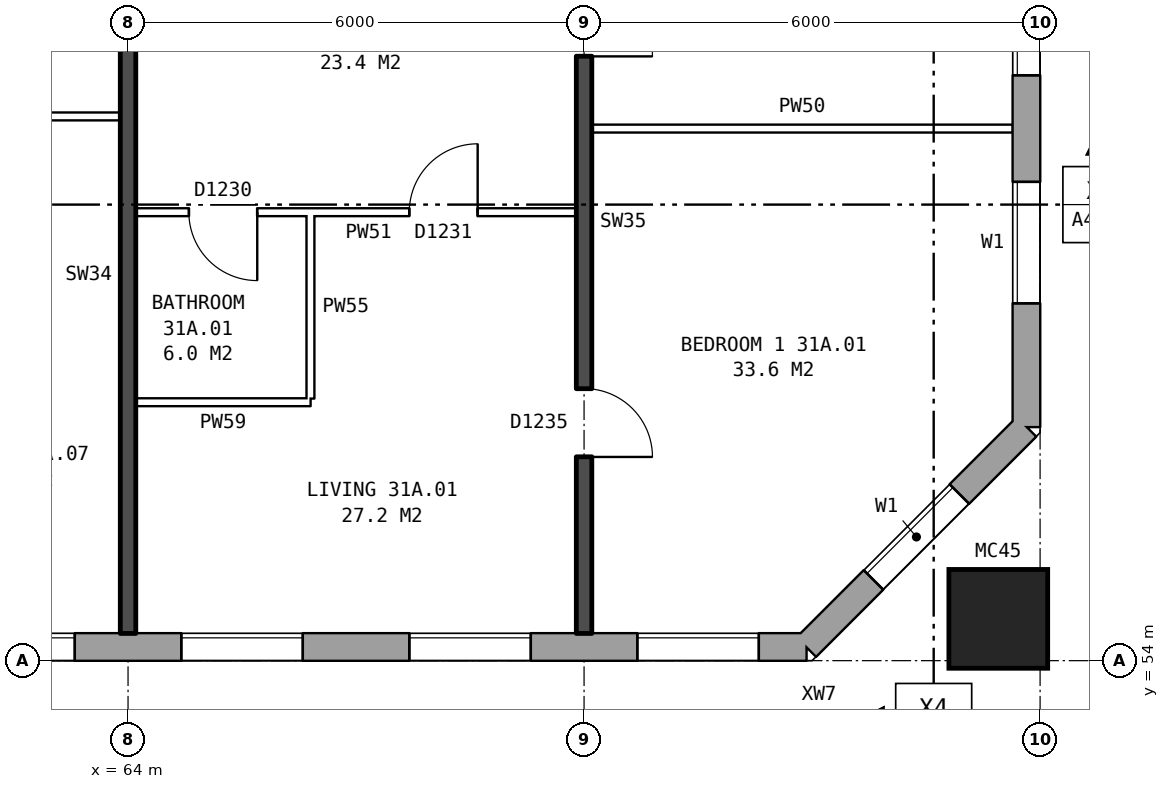
"""IFC4 building model, lengths in metres.
Left out: names, types, materials, properties, quantities, classifications, styles, units other than length and angle.
Written with IfcOpenShell. Run it as: python <this file> out.ifc"""

import sys

from ifc_helpers import new_model, si_unit, direction, frame, frame_2d, origin, origin_2d, place, context, subcontext, project, spatial, rectangle, hollow_rectangle, extrude, element, fill, save


model = new_model("IFC4")
c1 = context("Model", 3, precision=1e-05, world=origin(), true_north=direction((0.0, 1.0)))
c2 = subcontext(c1, "Body", "Model", "MODEL_VIEW")
j1 = project(units=[si_unit("LENGTHUNIT", "METRE"), si_unit("PLANEANGLEUNIT", "RADIAN")], contexts=[c1])
p1 = place(None, origin())
s1 = spatial("IfcSite", under=j1, at=p1, CompositionType="ELEMENT")
p2 = place(p1, origin())
s2 = spatial("IfcBuilding", under=s1, at=p2, CompositionType="ELEMENT")
p3 = place(p2, frame((0.0, 0.0, 111.9)))
s3 = spatial("IfcBuildingStorey", under=s2, at=p3, CompositionType="ELEMENT", Elevation=111.9)
p4 = place(p3, frame((75.45, 54.55, 0.0), z_axis=(0.0, 0.0, 1.0), x_axis=(1.0, 0.0, 0.0)))
e1 = element("IfcColumn", 1, at=p4, inside=s3, PredefinedType="COLUMN", context=c2, shape_type="SweptSolid", body=[
    extrude(hollow_rectangle(XDim=1.3, YDim=1.3, WallThickness=0.07, at=origin_2d()), origin(), (0.0, 0.0, 1.0), 3.1),
])
p5 = place(p3, frame((28.075, 54.18, 0.0), z_axis=(0.0, 0.0, 1.0), x_axis=(1.0, 0.0, 0.0)))
e2 = element("IfcWall", 2, at=p5, inside=s3, PredefinedType="STANDARD", context=c2, shape_type="SweptSolid", body=[
    extrude(rectangle(XDim=44.851, YDim=0.36, at=frame_2d((22.425, 0.0))), origin(), (0.0, 0.0, 1.0), 2.85),
])
p6 = place(p5, frame((0.625, 0.0, 0.8)))
e3 = element("IfcOpeningElement", 3, at=p6, cuts=e2, PredefinedType="OPENING", context=c2, shape_type="SweptSolid", body=[
    extrude(rectangle(XDim=1.6, YDim=1.8, at=frame_2d((0.8, 0.9))), frame((0.0, 0.19, 0.0), z_axis=(0.0, -1.0, 0.0), x_axis=(1.0, 0.0, 0.0)), (0.0, 0.0, 1.0), 0.38),
])
p7 = place(p5, frame((3.625, 0.0, 0.8)))
e4 = element("IfcOpeningElement", 4, at=p7, cuts=e2, PredefinedType="OPENING", context=c2, shape_type="SweptSolid", body=[
    extrude(rectangle(XDim=1.6, YDim=1.8, at=frame_2d((0.8, 0.9))), frame((0.0, 0.19, 0.0), z_axis=(0.0, -1.0, 0.0), x_axis=(1.0, 0.0, 0.0)), (0.0, 0.0, 1.0), 0.38),
])
p8 = place(p5, frame((6.625, 0.0, 0.8)))
e5 = element("IfcOpeningElement", 5, at=p8, cuts=e2, PredefinedType="OPENING", context=c2, shape_type="SweptSolid", body=[
    extrude(rectangle(XDim=1.6, YDim=1.8, at=frame_2d((0.8, 0.9))), frame((0.0, 0.19, 0.0), z_axis=(0.0, -1.0, 0.0), x_axis=(1.0, 0.0, 0.0)), (0.0, 0.0, 1.0), 0.38),
])
p9 = place(p5, frame((9.625, 0.0, 0.8)))
e6 = element("IfcOpeningElement", 6, at=p9, cuts=e2, PredefinedType="OPENING", context=c2, shape_type="SweptSolid", body=[
    extrude(rectangle(XDim=1.6, YDim=1.8, at=frame_2d((0.8, 0.9))), frame((0.0, 0.19, 0.0), z_axis=(0.0, -1.0, 0.0), x_axis=(1.0, 0.0, 0.0)), (0.0, 0.0, 1.0), 0.38),
])
p10 = place(p5, frame((12.625, 0.0, 0.8)))
e7 = element("IfcOpeningElement", 7, at=p10, cuts=e2, PredefinedType="OPENING", context=c2, shape_type="SweptSolid", body=[
    extrude(rectangle(XDim=1.6, YDim=1.8, at=frame_2d((0.8, 0.9))), frame((0.0, 0.19, 0.0), z_axis=(0.0, -1.0, 0.0), x_axis=(1.0, 0.0, 0.0)), (0.0, 0.0, 1.0), 0.38),
])
p11 = place(p5, frame((15.625, 0.0, 0.8)))
e8 = element("IfcOpeningElement", 8, at=p11, cuts=e2, PredefinedType="OPENING", context=c2, shape_type="SweptSolid", body=[
    extrude(rectangle(XDim=1.6, YDim=1.8, at=frame_2d((0.8, 0.9))), frame((0.0, 0.19, 0.0), z_axis=(0.0, -1.0, 0.0), x_axis=(1.0, 0.0, 0.0)), (0.0, 0.0, 1.0), 0.38),
])
p12 = place(p5, frame((18.125, 0.0, 0.8)))
e9 = element("IfcOpeningElement", 9, at=p12, cuts=e2, PredefinedType="OPENING", context=c2, shape_type="SweptSolid", body=[
    extrude(rectangle(XDim=1.0, YDim=1.8, at=frame_2d((0.5, 0.9))), frame((0.0, 0.19, 0.0), z_axis=(0.0, -1.0, 0.0), x_axis=(1.0, 0.0, 0.0)), (0.0, 0.0, 1.0), 0.38),
])
p13 = place(p5, frame((21.175, 0.0, 0.15)))
e10 = element("IfcOpeningElement", 10, at=p13, cuts=e2, PredefinedType="OPENING", context=c2, shape_type="SweptSolid", body=[
    extrude(rectangle(XDim=0.6, YDim=1.2, at=frame_2d((0.3, 0.6))), frame((0.0, 0.19, 0.0), z_axis=(0.0, -1.0, 0.0), x_axis=(1.0, 0.0, 0.0)), (0.0, 0.0, 1.0), 0.38),
])
p14 = place(p5, frame((24.425, 0.0, 1.7)))
e11 = element("IfcOpeningElement", 11, at=p14, cuts=e2, PredefinedType="OPENING", context=c2, shape_type="SweptSolid", body=[
    extrude(rectangle(XDim=1.0, YDim=0.9, at=frame_2d((0.5, 0.45))), frame((0.0, 0.19, 0.0), z_axis=(0.0, -1.0, 0.0), x_axis=(1.0, 0.0, 0.0)), (0.0, 0.0, 1.0), 0.38),
])
p15 = place(p5, frame((27.625, 0.0, 0.8)))
e12 = element("IfcOpeningElement", 12, at=p15, cuts=e2, PredefinedType="OPENING", context=c2, shape_type="SweptSolid", body=[
    extrude(rectangle(XDim=1.6, YDim=1.8, at=frame_2d((0.8, 0.9))), frame((0.0, 0.19, 0.0), z_axis=(0.0, -1.0, 0.0), x_axis=(1.0, 0.0, 0.0)), (0.0, 0.0, 1.0), 0.38),
])
p16 = place(p5, frame((30.625, 0.0, 0.8)))
e13 = element("IfcOpeningElement", 13, at=p16, cuts=e2, PredefinedType="OPENING", context=c2, shape_type="SweptSolid", body=[
    extrude(rectangle(XDim=1.6, YDim=1.8, at=frame_2d((0.8, 0.9))), frame((0.0, 0.19, 0.0), z_axis=(0.0, -1.0, 0.0), x_axis=(1.0, 0.0, 0.0)), (0.0, 0.0, 1.0), 0.38),
])
p17 = place(p5, frame((33.625, 0.0, 0.8)))
e14 = element("IfcOpeningElement", 14, at=p17, cuts=e2, PredefinedType="OPENING", context=c2, shape_type="SweptSolid", body=[
    extrude(rectangle(XDim=1.6, YDim=1.8, at=frame_2d((0.8, 0.9))), frame((0.0, 0.19, 0.0), z_axis=(0.0, -1.0, 0.0), x_axis=(1.0, 0.0, 0.0)), (0.0, 0.0, 1.0), 0.38),
])
p18 = place(p5, frame((36.625, 0.0, 0.8)))
e15 = element("IfcOpeningElement", 15, at=p18, cuts=e2, PredefinedType="OPENING", context=c2, shape_type="SweptSolid", body=[
    extrude(rectangle(XDim=1.6, YDim=1.8, at=frame_2d((0.8, 0.9))), frame((0.0, 0.19, 0.0), z_axis=(0.0, -1.0, 0.0), x_axis=(1.0, 0.0, 0.0)), (0.0, 0.0, 1.0), 0.38),
])
p19 = place(p5, frame((39.625, 0.0, 0.8)))
e16 = element("IfcOpeningElement", 16, at=p19, cuts=e2, PredefinedType="OPENING", context=c2, shape_type="SweptSolid", body=[
    extrude(rectangle(XDim=1.6, YDim=1.8, at=frame_2d((0.8, 0.9))), frame((0.0, 0.19, 0.0), z_axis=(0.0, -1.0, 0.0), x_axis=(1.0, 0.0, 0.0)), (0.0, 0.0, 1.0), 0.38),
])
p20 = place(p5, frame((42.625, 0.0, 0.8)))
e17 = element("IfcOpeningElement", 17, at=p20, cuts=e2, PredefinedType="OPENING", context=c2, shape_type="SweptSolid", body=[
    extrude(rectangle(XDim=1.6, YDim=1.8, at=frame_2d((0.8, 0.9))), frame((0.0, 0.19, 0.0), z_axis=(0.0, -1.0, 0.0), x_axis=(1.0, 0.0, 0.0)), (0.0, 0.0, 1.0), 0.38),
])
p21 = place(p5, frame((19.425, 0.0, 1.7)))
e18 = element("IfcOpeningElement", 18, at=p21, cuts=e2, PredefinedType="OPENING", context=c2, shape_type="SweptSolid", body=[
    extrude(rectangle(XDim=1.0, YDim=0.9, at=frame_2d((0.5, 0.45))), frame((0.0, 0.19, 0.0), z_axis=(0.0, -1.0, 0.0), x_axis=(1.0, 0.0, 0.0)), (0.0, 0.0, 1.0), 0.38),
])
p22 = place(p5, frame((22.075, 0.0, 0.15)))
e19 = element("IfcOpeningElement", 19, at=p22, cuts=e2, PredefinedType="OPENING", context=c2, shape_type="SweptSolid", body=[
    extrude(rectangle(XDim=1.6, YDim=1.2, at=frame_2d((0.8, 0.6))), frame((0.0, 0.19, 0.0), z_axis=(0.0, -1.0, 0.0), x_axis=(1.0, 0.0, 0.0)), (0.0, 0.0, 1.0), 0.38),
])
p23 = place(p5, frame((25.725, 0.0, 0.8)))
e20 = element("IfcOpeningElement", 20, at=p23, cuts=e2, PredefinedType="OPENING", context=c2, shape_type="SweptSolid", body=[
    extrude(rectangle(XDim=1.0, YDim=1.8, at=frame_2d((0.5, 0.9))), frame((0.0, 0.19, 0.0), z_axis=(0.0, -1.0, 0.0), x_axis=(1.0, 0.0, 0.0)), (0.0, 0.0, 1.0), 0.38),
])
p24 = place(p3, frame((72.925, 54.18, 0.0), z_axis=(0.0, 0.0, 1.0), x_axis=(0.707106781187, 0.707106781187, 0.0)))
e21 = element("IfcWall", 21, at=p24, inside=s3, PredefinedType="STANDARD", context=c2, shape_type="SweptSolid", body=[
    extrude(rectangle(XDim=4.094, YDim=0.36, at=frame_2d((2.047, 0.0))), origin(), (0.0, 0.0, 1.0), 2.85),
])
p25 = place(p24, frame((1.247, 0.0, 0.8)))
e22 = element("IfcOpeningElement", 22, at=p25, cuts=e21, PredefinedType="OPENING", context=c2, shape_type="SweptSolid", body=[
    extrude(rectangle(XDim=1.6, YDim=1.8, at=frame_2d((0.8, 0.9))), frame((0.0, 0.19, 0.0), z_axis=(0.0, -1.0, 0.0), x_axis=(1.0, 0.0, 0.0)), (0.0, 0.0, 1.0), 0.38),
])
p26 = place(p3, frame((75.82, 57.075, 0.0), z_axis=(0.0, 0.0, 1.0), x_axis=(0.0, 1.0, 0.0)))
e23 = element("IfcWall", 23, at=p26, inside=s3, PredefinedType="STANDARD", context=c2, shape_type="SweptSolid", body=[
    extrude(rectangle(XDim=25.851, YDim=0.36, at=frame_2d((12.925, 0.0))), origin(), (0.0, 0.0, 1.0), 2.85),
])
p27 = place(p26, frame((1.625, 0.0, 0.8)))
e24 = element("IfcOpeningElement", 24, at=p27, cuts=e23, PredefinedType="OPENING", context=c2, shape_type="SweptSolid", body=[
    extrude(rectangle(XDim=1.6, YDim=1.8, at=frame_2d((0.8, 0.9))), frame((0.0, 0.19, 0.0), z_axis=(0.0, -1.0, 0.0), x_axis=(1.0, 0.0, 0.0)), (0.0, 0.0, 1.0), 0.38),
])
p28 = place(p26, frame((4.625, 0.0, 0.8)))
e25 = element("IfcOpeningElement", 25, at=p28, cuts=e23, PredefinedType="OPENING", context=c2, shape_type="SweptSolid", body=[
    extrude(rectangle(XDim=1.6, YDim=1.8, at=frame_2d((0.8, 0.9))), frame((0.0, 0.19, 0.0), z_axis=(0.0, -1.0, 0.0), x_axis=(1.0, 0.0, 0.0)), (0.0, 0.0, 1.0), 0.38),
])
p29 = place(p26, frame((19.625, 0.0, 0.8)))
e26 = element("IfcOpeningElement", 26, at=p29, cuts=e23, PredefinedType="OPENING", context=c2, shape_type="SweptSolid", body=[
    extrude(rectangle(XDim=1.6, YDim=1.8, at=frame_2d((0.8, 0.9))), frame((0.0, 0.19, 0.0), z_axis=(0.0, -1.0, 0.0), x_axis=(1.0, 0.0, 0.0)), (0.0, 0.0, 1.0), 0.38),
])
p30 = place(p26, frame((22.625, 0.0, 0.8)))
e27 = element("IfcOpeningElement", 27, at=p30, cuts=e23, PredefinedType="OPENING", context=c2, shape_type="SweptSolid", body=[
    extrude(rectangle(XDim=1.6, YDim=1.8, at=frame_2d((0.8, 0.9))), frame((0.0, 0.19, 0.0), z_axis=(0.0, -1.0, 0.0), x_axis=(1.0, 0.0, 0.0)), (0.0, 0.0, 1.0), 0.38),
])
p31 = place(p3, frame((64.1, 57.4, 0.0), z_axis=(0.0, 0.0, 1.0), x_axis=(1.0, 0.0, 0.0)))
e28 = element("IfcWall", 28, at=p31, inside=s3, PredefinedType="PARTITIONING", context=c2, shape_type="SweptSolid", body=[
    extrude(rectangle(XDim=2.3, YDim=0.1, at=frame_2d((1.15, 0.0))), origin(), (0.0, 0.0, 1.0), 2.85),
])
p32 = place(p3, frame((64.1, 59.9, 0.0), z_axis=(0.0, 0.0, 1.0), x_axis=(1.0, 0.0, 0.0)))
e29 = element("IfcWall", 29, at=p32, inside=s3, PredefinedType="PARTITIONING", context=c2, shape_type="SweptSolid", body=[
    extrude(rectangle(XDim=5.8, YDim=0.1, at=frame_2d((2.9, 0.0))), origin(), (0.0, 0.0, 1.0), 2.85),
])
p33 = place(p32, frame((3.6, 0.0, 0.0)))
e30 = element("IfcOpeningElement", 30, at=p33, cuts=e29, PredefinedType="OPENING", context=c2, shape_type="SweptSolid", body=[
    extrude(rectangle(XDim=0.9, YDim=2.1, at=frame_2d((0.45, 1.05))), frame((0.0, 0.06, 0.0), z_axis=(0.0, -1.0, 0.0), x_axis=(1.0, 0.0, 0.0)), (0.0, 0.0, 1.0), 0.12),
])
p34 = place(p32, frame((0.7, 0.0, 0.0)))
e31 = element("IfcOpeningElement", 31, at=p34, cuts=e29, PredefinedType="OPENING", context=c2, shape_type="SweptSolid", body=[
    extrude(rectangle(XDim=0.9, YDim=2.1, at=frame_2d((0.45, 1.05))), frame((0.0, 0.06, 0.0), z_axis=(0.0, -1.0, 0.0), x_axis=(1.0, 0.0, 0.0)), (0.0, 0.0, 1.0), 0.12),
])
p35 = place(p3, frame((70.1, 61.0, 0.0), z_axis=(0.0, 0.0, 1.0), x_axis=(1.0, 0.0, 0.0)))
e32 = element("IfcWall", 32, at=p35, inside=s3, PredefinedType="PARTITIONING", context=c2, shape_type="SweptSolid", body=[
    extrude(rectangle(XDim=5.54, YDim=0.1, at=frame_2d((2.77, 0.0))), origin(), (0.0, 0.0, 1.0), 2.85),
])
p36 = place(p3, frame((61.0, 61.16, 0.0), z_axis=(0.0, 0.0, 1.0), x_axis=(1.0, 0.0, 0.0)))
e33 = element("IfcWall", 33, at=p36, inside=s3, PredefinedType="PARTITIONING", context=c2, shape_type="SweptSolid", body=[
    extrude(rectangle(XDim=2.9, YDim=0.1, at=frame_2d((1.45, 0.0))), origin(), (0.0, 0.0, 1.0), 2.85),
])
p37 = place(p36, frame((1.0, 0.0, 0.0)))
e34 = element("IfcOpeningElement", 34, at=p37, cuts=e33, PredefinedType="OPENING", context=c2, shape_type="SweptSolid", body=[
    extrude(rectangle(XDim=0.9, YDim=2.1, at=frame_2d((0.45, 1.05))), frame((0.0, 0.06, 0.0), z_axis=(0.0, -1.0, 0.0), x_axis=(1.0, 0.0, 0.0)), (0.0, 0.0, 1.0), 0.12),
])
p38 = place(p3, frame((64.0, 54.36, 0.0), z_axis=(0.0, 0.0, 1.0), x_axis=(0.0, 1.0, 0.0)))
e35 = element("IfcWall", 35, at=p38, inside=s3, PredefinedType="SOLIDWALL", context=c2, shape_type="SweptSolid", body=[
    extrude(rectangle(XDim=9.44, YDim=0.2, at=frame_2d((4.72, 0.0))), origin(), (0.0, 0.0, 1.0), 2.85),
])
p39 = place(p3, frame((66.4, 57.45, 0.0), z_axis=(0.0, 0.0, 1.0), x_axis=(0.0, 1.0, 0.0)))
e36 = element("IfcWall", 36, at=p39, inside=s3, PredefinedType="PARTITIONING", context=c2, shape_type="SweptSolid", body=[
    extrude(rectangle(XDim=2.4, YDim=0.1, at=frame_2d((1.2, 0.0))), origin(), (0.0, 0.0, 1.0), 2.85),
])
p40 = place(p3, frame((70.0, 54.36, 0.0), z_axis=(0.0, 0.0, 1.0), x_axis=(0.0, 1.0, 0.0)))
e37 = element("IfcWall", 37, at=p40, inside=s3, PredefinedType="SOLIDWALL", context=c2, shape_type="SweptSolid", body=[
    extrude(rectangle(XDim=9.44, YDim=0.2, at=frame_2d((4.72, 0.0))), origin(), (0.0, 0.0, 1.0), 2.85),
])
p41 = place(p40, frame((2.32, 0.0, 0.0)))
e38 = element("IfcOpeningElement", 38, at=p41, cuts=e37, PredefinedType="OPENING", context=c2, shape_type="SweptSolid", body=[
    extrude(rectangle(XDim=0.9, YDim=2.1, at=frame_2d((0.45, 1.05))), frame((0.0, 0.11, 0.0), z_axis=(0.0, -1.0, 0.0), x_axis=(1.0, 0.0, 0.0)), (0.0, 0.0, 1.0), 0.22),
])
p42 = place(p40, frame((7.59, 0.0, 0.0)))
e39 = element("IfcOpeningElement", 39, at=p42, cuts=e37, PredefinedType="OPENING", context=c2, shape_type="SweptSolid", body=[
    extrude(rectangle(XDim=0.9, YDim=2.1, at=frame_2d((0.45, 1.05))), frame((0.0, 0.11, 0.0), z_axis=(0.0, -1.0, 0.0), x_axis=(1.0, 0.0, 0.0)), (0.0, 0.0, 1.0), 0.22),
])
p43 = place(p17, origin())
e40 = element("IfcWindow", 40, at=p43, inside=s3, PartitioningType="SINGLE_PANEL", PredefinedType="WINDOW", context=c2, shape_type="SweptSolid", body=[
    extrude(rectangle(XDim=1.6, YDim=1.8, at=frame_2d((0.8, 0.9))), frame((0.0, 0.15, 0.0), z_axis=(0.0, -1.0, 0.0), x_axis=(1.0, 0.0, 0.0)), (0.0, 0.0, 1.0), 0.06),
])
fill(e14, e40)
p44 = place(p18, origin())
e41 = element("IfcWindow", 41, at=p44, inside=s3, PartitioningType="SINGLE_PANEL", PredefinedType="WINDOW", context=c2, shape_type="SweptSolid", body=[
    extrude(rectangle(XDim=1.6, YDim=1.8, at=frame_2d((0.8, 0.9))), frame((0.0, 0.15, 0.0), z_axis=(0.0, -1.0, 0.0), x_axis=(1.0, 0.0, 0.0)), (0.0, 0.0, 1.0), 0.06),
])
fill(e15, e41)
p45 = place(p19, origin())
e42 = element("IfcWindow", 42, at=p45, inside=s3, PartitioningType="SINGLE_PANEL", PredefinedType="WINDOW", context=c2, shape_type="SweptSolid", body=[
    extrude(rectangle(XDim=1.6, YDim=1.8, at=frame_2d((0.8, 0.9))), frame((0.0, 0.15, 0.0), z_axis=(0.0, -1.0, 0.0), x_axis=(1.0, 0.0, 0.0)), (0.0, 0.0, 1.0), 0.06),
])
fill(e16, e42)
p46 = place(p20, origin())
e43 = element("IfcWindow", 43, at=p46, inside=s3, PartitioningType="SINGLE_PANEL", PredefinedType="WINDOW", context=c2, shape_type="SweptSolid", body=[
    extrude(rectangle(XDim=1.6, YDim=1.8, at=frame_2d((0.8, 0.9))), frame((0.0, 0.15, 0.0), z_axis=(0.0, -1.0, 0.0), x_axis=(1.0, 0.0, 0.0)), (0.0, 0.0, 1.0), 0.06),
])
fill(e17, e43)
p47 = place(p25, origin())
e44 = element("IfcWindow", 44, at=p47, inside=s3, PartitioningType="SINGLE_PANEL", PredefinedType="WINDOW", context=c2, shape_type="SweptSolid", body=[
    extrude(rectangle(XDim=1.6, YDim=1.8, at=frame_2d((0.8, 0.9))), frame((0.0, 0.15, 0.0), z_axis=(0.0, -1.0, 0.0), x_axis=(1.0, 0.0, 0.0)), (0.0, 0.0, 1.0), 0.06),
])
fill(e22, e44)
p48 = place(p27, origin())
e45 = element("IfcWindow", 45, at=p48, inside=s3, PartitioningType="SINGLE_PANEL", PredefinedType="WINDOW", context=c2, shape_type="SweptSolid", body=[
    extrude(rectangle(XDim=1.6, YDim=1.8, at=frame_2d((0.8, 0.9))), frame((0.0, 0.15, 0.0), z_axis=(0.0, -1.0, 0.0), x_axis=(1.0, 0.0, 0.0)), (0.0, 0.0, 1.0), 0.06),
])
fill(e24, e45)
p49 = place(p28, origin())
e46 = element("IfcWindow", 46, at=p49, inside=s3, PartitioningType="SINGLE_PANEL", PredefinedType="WINDOW", context=c2, shape_type="SweptSolid", body=[
    extrude(rectangle(XDim=1.6, YDim=1.8, at=frame_2d((0.8, 0.9))), frame((0.0, 0.15, 0.0), z_axis=(0.0, -1.0, 0.0), x_axis=(1.0, 0.0, 0.0)), (0.0, 0.0, 1.0), 0.06),
])
fill(e25, e46)
p50 = place(p41, frame((0.9, 0.0, 0.0), z_axis=(0.0, 0.0, 1.0), x_axis=(-1.0, 0.0, 0.0)))
e47 = element("IfcDoor", 47, at=p50, inside=s3, OperationType="SINGLE_SWING_RIGHT", PredefinedType="DOOR", context=c2, shape_type="SweptSolid", body=[
    extrude(rectangle(XDim=0.9, YDim=2.1, at=frame_2d((0.45, 1.05))), frame((0.0, 0.025, 0.0), z_axis=(0.0, -1.0, 0.0), x_axis=(1.0, 0.0, 0.0)), (0.0, 0.0, 1.0), 0.05),
])
fill(e38, e47)
p51 = place(p42, frame((0.9, 0.0, 0.0), z_axis=(0.0, 0.0, 1.0), x_axis=(-1.0, 0.0, 0.0)))
e48 = element("IfcDoor", 48, at=p51, inside=s3, OperationType="SINGLE_SWING_RIGHT", PredefinedType="DOOR", context=c2, shape_type="SweptSolid", body=[
    extrude(rectangle(XDim=0.9, YDim=2.1, at=frame_2d((0.45, 1.05))), frame((0.0, 0.025, 0.0), z_axis=(0.0, -1.0, 0.0), x_axis=(1.0, 0.0, 0.0)), (0.0, 0.0, 1.0), 0.05),
])
fill(e39, e48)
p52 = place(p33, origin())
e49 = element("IfcDoor", 49, at=p52, inside=s3, OperationType="SINGLE_SWING_RIGHT", PredefinedType="DOOR", context=c2, shape_type="SweptSolid", body=[
    extrude(rectangle(XDim=0.9, YDim=2.1, at=frame_2d((0.45, 1.05))), frame((0.0, 0.025, 0.0), z_axis=(0.0, -1.0, 0.0), x_axis=(1.0, 0.0, 0.0)), (0.0, 0.0, 1.0), 0.05),
])
fill(e30, e49)
p53 = place(p34, frame((0.9, 0.0, 0.0), z_axis=(0.0, 0.0, 1.0), x_axis=(-1.0, 0.0, 0.0)))
e50 = element("IfcDoor", 50, at=p53, inside=s3, OperationType="SINGLE_SWING_LEFT", PredefinedType="DOOR", context=c2, shape_type="SweptSolid", body=[
    extrude(rectangle(XDim=0.9, YDim=2.1, at=frame_2d((0.45, 1.05))), frame((0.0, 0.025, 0.0), z_axis=(0.0, -1.0, 0.0), x_axis=(1.0, 0.0, 0.0)), (0.0, 0.0, 1.0), 0.05),
])
fill(e31, e50)
save(model, sys.argv[1])
